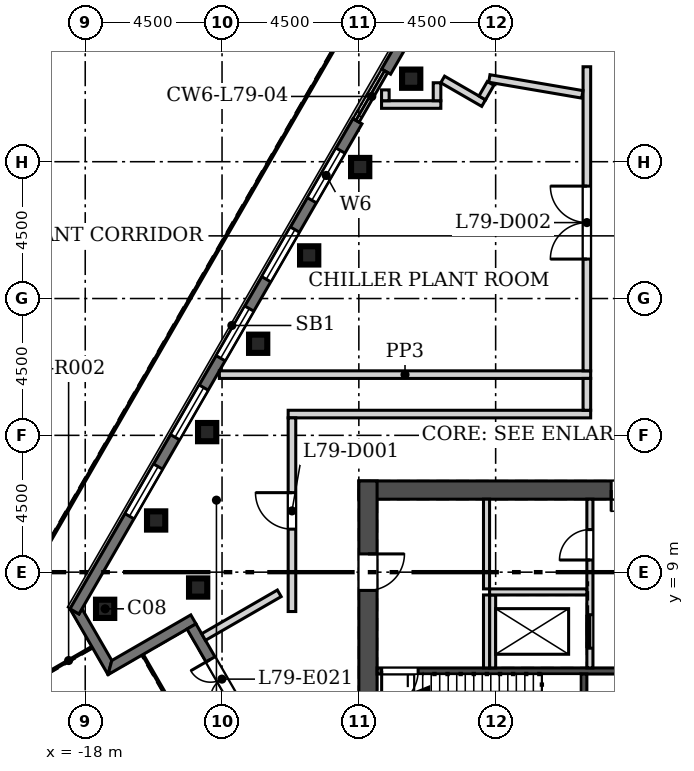
"""IFC4 building model, lengths in metres.
Left out: names, types, materials, properties, quantities, classifications, styles, units other than length and angle.
Written with IfcOpenShell. Run it as: python <this file> out.ifc"""

import sys

from ifc_helpers import new_model, si_unit, direction, frame, frame_2d, origin, origin_2d, place, context, subcontext, project, spatial, polyline, rectangle, hollow_rectangle, outline, extrude, element, fill, save


model = new_model("IFC4")
c1 = context("Model", 3, precision=1e-05, world=origin(), true_north=direction((0.0, 1.0)))
c2 = subcontext(c1, "Body", "Model", "MODEL_VIEW")
j1 = project(units=[si_unit("LENGTHUNIT", "METRE"), si_unit("PLANEANGLEUNIT", "RADIAN")], contexts=[c1])
p1 = place(None, origin())
s1 = spatial("IfcSite", under=j1, at=p1, CompositionType="ELEMENT")
p2 = place(p1, origin())
s2 = spatial("IfcBuilding", under=s1, at=p2, CompositionType="ELEMENT")
p3 = place(p2, frame((0.0, 0.0, 350.1)))
s3 = spatial("IfcBuildingStorey", under=s2, at=p3, CompositionType="ELEMENT", Elevation=350.1)
for number, where, z_axis, x_axis in (
    (1, (-17.345, 7.794, 0.0), (0.0, 0.0, 1.0), (1.0, 0.0, 0.0)),
    (2, (-14.286, 8.495, 0.0), (0.0, 0.0, 1.0), (1.0, 0.0, 0.0)),
    (3, (-7.278, 25.231, 0.0), (0.0, 0.0, 1.0), (1.0, 0.0, 0.0)),
    (4, (-8.956, 22.325, 0.0), (0.0, 0.0, 1.0), (1.0, 0.0, 0.0)),
    (5, (-10.634, 19.419, 0.0), (0.0, 0.0, 1.0), (1.0, 0.0, 0.0)),
    (6, (-12.312, 16.512, 0.0), (0.0, 0.0, 1.0), (1.0, 0.0, 0.0)),
    (7, (-13.99, 13.606, 0.0), (0.0, 0.0, 1.0), (1.0, 0.0, 0.0)),
    (8, (-15.667, 10.7, 0.0), (0.0, 0.0, 1.0), (1.0, 0.0, 0.0)),
):
    element("IfcColumn", number, at=place(p3, frame(where, z_axis=z_axis, x_axis=x_axis)), inside=s3, PredefinedType="COLUMN", context=c2, shape_type="SweptSolid", body=[
        extrude(hollow_rectangle(XDim=0.6, YDim=0.6, WallThickness=0.03, at=origin_2d()), origin(), (0.0, 0.0, 1.0), 4.4),
    ])
p4 = place(p3, frame((9.0, 11.7, 0.0), z_axis=(0.0, 0.0, 1.0), x_axis=(-1.0, 0.0, 0.0)))
e9 = element("IfcWall", 9, at=p4, inside=s3, PredefinedType="SHEAR", context=c2, shape_type="SweptSolid", body=[
    extrude(rectangle(XDim=18.0, YDim=0.6, at=frame_2d((9.0, 0.0))), origin(), (0.0, 0.0, 1.0), 5.0),
])
p5 = place(p4, frame((8.3, 0.0, 0.0)))
e10 = element("IfcOpeningElement", 10, at=p5, cuts=e9, PredefinedType="OPENING", context=c2, shape_type="SweptSolid", body=[
    extrude(rectangle(XDim=1.4, YDim=2.1, at=frame_2d((0.7, 1.05))), frame((0.0, 0.31, 0.0), z_axis=(0.0, -1.0, 0.0), x_axis=(1.0, 0.0, 0.0)), (0.0, 0.0, 1.0), 0.62),
])
p6 = place(p3, frame((-8.7, 12.0, 0.0), z_axis=(0.0, 0.0, 1.0), x_axis=(0.0, -1.0, 0.0)))
e11 = element("IfcWall", 11, at=p6, inside=s3, PredefinedType="SHEAR", context=c2, shape_type="SweptSolid", body=[
    extrude(rectangle(XDim=11.15, YDim=0.6, at=frame_2d((5.575, 0.0))), origin(), (0.0, 0.0, 1.0), 5.0),
])
p7 = place(p6, frame((2.4, 0.0, 0.0)))
e12 = element("IfcOpeningElement", 12, at=p7, cuts=e11, PredefinedType="OPENING", context=c2, shape_type="SweptSolid", body=[
    extrude(rectangle(XDim=1.2, YDim=2.1, at=frame_2d((0.6, 1.05))), frame((0.0, 0.31, 0.0), z_axis=(0.0, -1.0, 0.0), x_axis=(1.0, 0.0, 0.0)), (0.0, 0.0, 1.0), 0.62),
])
p8 = place(p3, origin())
e13 = element("IfcWall", 13, at=p8, inside=s3, PredefinedType="SOLIDWALL", context=c2, shape_type="SweptSolid", body=[
    extrude(outline(polyline([(-17.25, 5.628), (-18.501, 7.795), (-18.501, 7.795), (-18.206, 7.625), (-18.107, 7.795), (-17.125, 6.094), (-17.25, 5.628), (-17.25, 5.628)])), origin(), (0.0, 0.0, 1.0), 4.4),
])
p9 = place(p3, origin())
e14 = element("IfcWall", 14, at=p9, inside=s3, PredefinedType="SOLIDWALL", context=c2, shape_type="SweptSolid", body=[
    extrude(outline(polyline([(-14.527, 7.594), (-14.357, 7.299), (-14.652, 7.129), (-17.25, 5.628), (-17.251, 5.628), (-17.126, 6.094), (-14.527, 7.594)])), origin(), (0.0, 0.0, 1.0), 4.4),
])
p10 = place(p3, frame((-14.505, 7.214, 0.0), z_axis=(0.0, 0.0, 1.0), x_axis=(0.49999894854, -0.866026010844, 0.0)))
e15 = element("IfcWall", 15, at=p10, inside=s3, PredefinedType="SOLIDWALL", context=c2, shape_type="SweptSolid", body=[
    extrude(rectangle(XDim=4.0, YDim=0.34, at=frame_2d((2.0, 0.0))), origin(), (0.0, 0.0, 1.0), 4.4),
])
p11 = place(p10, frame((1.25, 0.0, 0.0)))
e16 = element("IfcOpeningElement", 16, at=p11, cuts=e15, PredefinedType="OPENING", context=c2, shape_type="SweptSolid", body=[
    extrude(rectangle(XDim=1.5, YDim=2.4, at=frame_2d((0.75, 1.2))), frame((0.0, 0.18, 0.0), z_axis=(0.0, -1.0, 0.0), x_axis=(1.0, 0.0, 0.0)), (0.0, 0.0, 1.0), 0.36),
])
p12 = place(p3, frame((-6.045, 29.026, 0.0), z_axis=(0.0, 0.0, 1.0), x_axis=(-0.500018604663, -0.866014662111, 0.0)))
e17 = element("IfcWall", 17, at=p12, inside=s3, PredefinedType="SOLIDWALL", context=c2, shape_type="SweptSolid", body=[
    extrude(rectangle(XDim=4.115, YDim=0.34, at=frame_2d((2.058, 0.0))), origin(), (0.0, 0.0, 1.0), 4.4),
])
p13 = place(p12, frame((1.115, 0.0, 0.0)))
e18 = element("IfcOpeningElement", 18, at=p13, cuts=e17, PredefinedType="OPENING", context=c2, shape_type="SweptSolid", body=[
    extrude(rectangle(XDim=1.885, YDim=2.6, at=frame_2d((0.942, 1.3))), frame((0.0, 0.18, 0.0), z_axis=(0.0, -1.0, 0.0), x_axis=(1.0, 0.0, 0.0)), (0.0, 0.0, 1.0), 0.36),
])
p14 = place(p3, frame((-9.045, 23.83, 0.0), z_axis=(0.0, 0.0, 1.0), x_axis=(-0.500004003655, -0.866023092261, 0.0)))
e19 = element("IfcWall", 19, at=p14, inside=s3, PredefinedType="SOLIDWALL", context=c2, shape_type="SweptSolid", body=[
    extrude(rectangle(XDim=18.615, YDim=0.34, at=frame_2d((9.308, 0.0))), origin(), (0.0, 0.0, 1.0), 4.4),
])
p15 = place(p14, frame((1.115, 0.0, 0.9)))
e20 = element("IfcOpeningElement", 20, at=p15, cuts=e19, PredefinedType="OPENING", context=c2, shape_type="SweptSolid", body=[
    extrude(rectangle(XDim=1.885, YDim=3.0, at=frame_2d((0.942, 1.5))), frame((0.0, 0.18, 0.0), z_axis=(0.0, -1.0, 0.0), x_axis=(1.0, 0.0, 0.0)), (0.0, 0.0, 1.0), 0.36),
])
p16 = place(p14, frame((4.115, 0.0, 0.9)))
e21 = element("IfcOpeningElement", 21, at=p16, cuts=e19, PredefinedType="OPENING", context=c2, shape_type="SweptSolid", body=[
    extrude(rectangle(XDim=1.885, YDim=3.0, at=frame_2d((0.942, 1.5))), frame((0.0, 0.18, 0.0), z_axis=(0.0, -1.0, 0.0), x_axis=(1.0, 0.0, 0.0)), (0.0, 0.0, 1.0), 0.36),
])
p17 = place(p14, frame((7.115, 0.0, 0.9)))
e22 = element("IfcOpeningElement", 22, at=p17, cuts=e19, PredefinedType="OPENING", context=c2, shape_type="SweptSolid", body=[
    extrude(rectangle(XDim=1.885, YDim=3.0, at=frame_2d((0.942, 1.5))), frame((0.0, 0.18, 0.0), z_axis=(0.0, -1.0, 0.0), x_axis=(1.0, 0.0, 0.0)), (0.0, 0.0, 1.0), 0.36),
])
p18 = place(p14, frame((10.115, 0.0, 0.9)))
e23 = element("IfcOpeningElement", 23, at=p18, cuts=e19, PredefinedType="OPENING", context=c2, shape_type="SweptSolid", body=[
    extrude(rectangle(XDim=1.885, YDim=3.0, at=frame_2d((0.942, 1.5))), frame((0.0, 0.18, 0.0), z_axis=(0.0, -1.0, 0.0), x_axis=(1.0, 0.0, 0.0)), (0.0, 0.0, 1.0), 0.36),
])
p19 = place(p14, frame((13.115, 0.0, 0.9)))
e24 = element("IfcOpeningElement", 24, at=p19, cuts=e19, PredefinedType="OPENING", context=c2, shape_type="SweptSolid", body=[
    extrude(rectangle(XDim=1.885, YDim=3.0, at=frame_2d((0.942, 1.5))), frame((0.0, 0.18, 0.0), z_axis=(0.0, -1.0, 0.0), x_axis=(1.0, 0.0, 0.0)), (0.0, 0.0, 1.0), 0.36),
])
p20 = place(p3, frame((-8.4, 5.75, -0.6), z_axis=(0.0, 0.0, 1.0), x_axis=(1.0, 0.0, 0.0)))
e25 = element("IfcWall", 25, at=p20, inside=s3, PredefinedType="SOLIDWALL", context=c2, shape_type="SweptSolid", body=[
    extrude(rectangle(XDim=16.8, YDim=0.2, at=frame_2d((8.4, 0.0))), origin(), (0.0, 0.0, 1.0), 5.0),
])
p21 = place(p20, frame((7.9, 0.0, 0.6)))
e26 = element("IfcOpeningElement", 26, at=p21, cuts=e25, PredefinedType="OPENING", context=c2, shape_type="SweptSolid", body=[
    extrude(rectangle(XDim=1.0, YDim=2.1, at=frame_2d((0.5, 1.05))), frame((0.0, 0.11, 0.0), z_axis=(0.0, -1.0, 0.0), x_axis=(1.0, 0.0, 0.0)), (0.0, 0.0, 1.0), 0.22),
])
p22 = place(p20, frame((0.15, 0.0, 0.6)))
e27 = element("IfcOpeningElement", 27, at=p22, cuts=e25, PredefinedType="OPENING", context=c2, shape_type="SweptSolid", body=[
    extrude(rectangle(XDim=1.2, YDim=2.1, at=frame_2d((0.6, 1.05))), frame((0.0, 0.11, 0.0), z_axis=(0.0, -1.0, 0.0), x_axis=(1.0, 0.0, 0.0)), (0.0, 0.0, 1.0), 0.22),
])
p23 = place(p20, frame((15.45, 0.0, 0.6)))
e28 = element("IfcOpeningElement", 28, at=p23, cuts=e25, PredefinedType="OPENING", context=c2, shape_type="SweptSolid", body=[
    extrude(rectangle(XDim=1.2, YDim=2.1, at=frame_2d((0.6, 1.05))), frame((0.0, 0.11, 0.0), z_axis=(0.0, -1.0, 0.0), x_axis=(1.0, 0.0, 0.0)), (0.0, 0.0, 1.0), 0.22),
])
p24 = place(p3, frame((-1.6, 1.45, -0.6), z_axis=(0.0, 0.0, 1.0), x_axis=(0.0, 1.0, 0.0)))
e29 = element("IfcWall", 29, at=p24, inside=s3, PredefinedType="SOLIDWALL", context=c2, shape_type="SweptSolid", body=[
    extrude(rectangle(XDim=4.2, YDim=0.2, at=frame_2d((2.1, 0.0))), origin(), (0.0, 0.0, 1.0), 5.0),
])
p25 = place(p3, frame((-1.4, 5.85, 0.0), z_axis=(0.0, 0.0, 1.0), x_axis=(0.0, 1.0, 0.0)))
e30 = element("IfcWall", 30, at=p25, inside=s3, PredefinedType="SOLIDWALL", context=c2, shape_type="SweptSolid", body=[
    extrude(rectangle(XDim=5.55, YDim=0.2, at=frame_2d((2.775, 0.0))), origin(), (0.0, 0.0, 1.0), 4.4),
])
p26 = place(p25, frame((0.65, 0.0, 0.0)))
e31 = element("IfcOpeningElement", 31, at=p26, cuts=e30, PredefinedType="OPENING", context=c2, shape_type="SweptSolid", body=[
    extrude(rectangle(XDim=1.1, YDim=2.1, at=frame_2d((0.55, 1.05))), frame((0.0, 0.11, 0.0), z_axis=(0.0, -1.0, 0.0), x_axis=(1.0, 0.0, 0.0)), (0.0, 0.0, 1.0), 0.22),
])
p27 = place(p25, frame((3.55, 0.0, 0.0)))
e32 = element("IfcOpeningElement", 32, at=p27, cuts=e30, PredefinedType="OPENING", context=c2, shape_type="SweptSolid", body=[
    extrude(rectangle(XDim=1.0, YDim=2.1, at=frame_2d((0.5, 1.05))), frame((0.0, 0.11, 0.0), z_axis=(0.0, -1.0, 0.0), x_axis=(1.0, 0.0, 0.0)), (0.0, 0.0, 1.0), 0.22),
])
p28 = place(p3, frame((-4.6, 5.85, 0.0), z_axis=(0.0, 0.0, 1.0), x_axis=(0.0, 1.0, 0.0)))
e33 = element("IfcWall", 33, at=p28, inside=s3, PredefinedType="SOLIDWALL", context=c2, shape_type="SweptSolid", body=[
    extrude(rectangle(XDim=2.4, YDim=0.2, at=frame_2d((1.2, 0.0))), origin(), (0.0, 0.0, 1.0), 4.4),
])
p29 = place(p3, frame((-4.7, 8.35, 0.0), z_axis=(0.0, 0.0, 1.0), x_axis=(1.0, 0.0, 0.0)))
e34 = element("IfcWall", 34, at=p29, inside=s3, PredefinedType="SOLIDWALL", context=c2, shape_type="SweptSolid", body=[
    extrude(rectangle(XDim=3.2, YDim=0.2, at=frame_2d((1.6, 0.0))), origin(), (0.0, 0.0, 1.0), 4.4),
])
p30 = place(p3, frame((-4.8, 8.45, 0.0), z_axis=(0.0, 0.0, 1.0), x_axis=(0.0, 1.0, 0.0)))
e35 = element("IfcWall", 35, at=p30, inside=s3, PredefinedType="SOLIDWALL", context=c2, shape_type="SweptSolid", body=[
    extrude(rectangle(XDim=2.95, YDim=0.2, at=frame_2d((1.475, 0.0))), origin(), (0.0, 0.0, 1.0), 4.4),
])
p31 = place(p3, frame((-4.8, 5.85, 0.0), z_axis=(0.0, 0.0, 1.0), x_axis=(0.0, 1.0, 0.0)))
e36 = element("IfcWall", 36, at=p31, inside=s3, PredefinedType="SOLIDWALL", context=c2, shape_type="SweptSolid", body=[
    extrude(rectangle(XDim=2.4, YDim=0.2, at=frame_2d((1.2, 0.0))), origin(), (0.0, 0.0, 1.0), 4.4),
])
p32 = place(p3, frame((-13.588, 15.497, 0.0), z_axis=(0.0, 0.0, 1.0), x_axis=(1.0, 0.0, 0.0)))
e37 = element("IfcWall", 37, at=p32, inside=s3, PredefinedType="SOLIDWALL", context=c2, shape_type="SweptSolid", body=[
    extrude(rectangle(XDim=12.213, YDim=0.25, at=frame_2d((6.106, 0.0))), origin(), (0.0, 0.0, 1.0), 4.4),
])
p33 = place(p3, frame((-1.5, 15.622, 0.0), z_axis=(0.0, 0.0, 1.0), x_axis=(0.0, 1.0, 0.0)))
e38 = element("IfcWall", 38, at=p33, inside=s3, PredefinedType="SOLIDWALL", context=c2, shape_type="SweptSolid", body=[
    extrude(rectangle(XDim=10.001, YDim=0.25, at=frame_2d((5.0, 0.0))), origin(), (0.0, 0.0, 1.0), 4.4),
])
p34 = place(p33, frame((3.676, 0.0, 0.0)))
e39 = element("IfcOpeningElement", 39, at=p34, cuts=e38, PredefinedType="OPENING", context=c2, shape_type="SweptSolid", body=[
    extrude(rectangle(XDim=2.4, YDim=2.4, at=frame_2d((1.2, 1.2))), frame((0.0, 0.135, 0.0), z_axis=(0.0, -1.0, 0.0), x_axis=(1.0, 0.0, 0.0)), (0.0, 0.0, 1.0), 0.27),
])
p35 = place(p3, frame((-11.325, 14.2, 0.0), z_axis=(0.0, 0.0, 1.0), x_axis=(1.0, 0.0, 0.0)))
e40 = element("IfcWall", 40, at=p35, inside=s3, PredefinedType="SOLIDWALL", context=c2, shape_type="SweptSolid", body=[
    extrude(rectangle(XDim=9.95, YDim=0.25, at=frame_2d((4.975, 0.0))), origin(), (0.0, 0.0, 1.0), 4.4),
])
p36 = place(p3, frame((-11.2, 7.705, 0.0), z_axis=(0.0, 0.0, 1.0), x_axis=(0.0, 1.0, 0.0)))
e41 = element("IfcWall", 41, at=p36, inside=s3, PredefinedType="SOLIDWALL", context=c2, shape_type="SweptSolid", body=[
    extrude(rectangle(XDim=6.37, YDim=0.25, at=frame_2d((3.185, 0.0))), origin(), (0.0, 0.0, 1.0), 4.4),
])
p37 = place(p36, frame((2.71, 0.0, 0.0)))
e42 = element("IfcOpeningElement", 42, at=p37, cuts=e41, PredefinedType="OPENING", context=c2, shape_type="SweptSolid", body=[
    extrude(rectangle(XDim=1.2, YDim=2.1, at=frame_2d((0.6, 1.05))), frame((0.0, 0.135, 0.0), z_axis=(0.0, -1.0, 0.0), x_axis=(1.0, 0.0, 0.0)), (0.0, 0.0, 1.0), 0.27),
])
p38 = place(p3, frame((-1.649, 24.715, 0.0), z_axis=(0.0, 0.0, 1.0), x_axis=(-0.98569851909, 0.168518335692, 0.0)))
e43 = element("IfcWall", 43, at=p38, inside=s3, PredefinedType="SOLIDWALL", context=c2, shape_type="SweptSolid", body=[
    extrude(rectangle(XDim=3.103, YDim=0.25, at=frame_2d((1.552, 0.0))), origin(), (0.0, 0.0, 1.0), 4.4),
])
p39 = place(p3, frame((-14.107, 6.866, 0.0), z_axis=(0.0, 0.0, 1.0), x_axis=(0.866018712932, 0.500011588718, 0.0)))
e44 = element("IfcWall", 44, at=p39, inside=s3, PredefinedType="SOLIDWALL", context=c2, shape_type="SweptSolid", body=[
    extrude(rectangle(XDim=2.875, YDim=0.25, at=frame_2d((1.438, 0.0))), origin(), (0.0, 0.0, 1.0), 4.4),
])
p40 = place(p3, frame((-6.303, 24.381, 0.0), z_axis=(0.0, 0.0, 1.0), x_axis=(-1.0, 0.0, 0.0)))
e45 = element("IfcWall", 45, at=p40, inside=s3, PredefinedType="SOLIDWALL", context=c2, shape_type="SweptSolid", body=[
    extrude(rectangle(XDim=1.95, YDim=0.25, at=frame_2d((0.975, 0.0))), origin(), (0.0, 0.0, 1.0), 4.4),
])
p41 = place(p3, frame((-4.896, 24.428, 0.0), z_axis=(0.0, 0.0, 1.0), x_axis=(-0.86604181439, 0.49997157492, 0.0)))
e46 = element("IfcWall", 46, at=p41, inside=s3, PredefinedType="SOLIDWALL", context=c2, shape_type="SweptSolid", body=[
    extrude(rectangle(XDim=1.555, YDim=0.25, at=frame_2d((0.778, 0.0))), origin(), (0.0, 0.0, 1.0), 4.4),
])
p42 = place(p3, frame((-1.5, 14.325, 0.0), z_axis=(0.0, 0.0, 1.0), x_axis=(0.0, 1.0, 0.0)))
e47 = element("IfcWall", 47, at=p42, inside=s3, PredefinedType="SOLIDWALL", context=c2, shape_type="SweptSolid", body=[
    extrude(rectangle(XDim=1.047, YDim=0.25, at=frame_2d((0.523, 0.0))), origin(), (0.0, 0.0, 1.0), 4.4),
])
p43 = place(p3, frame((-6.428, 25.097, 0.0), z_axis=(0.0, 0.0, 1.0), x_axis=(0.0, -1.0, 0.0)))
e48 = element("IfcWall", 48, at=p43, inside=s3, PredefinedType="SOLIDWALL", context=c2, shape_type="SweptSolid", body=[
    extrude(rectangle(XDim=0.591, YDim=0.25, at=frame_2d((0.295, 0.0))), origin(), (0.0, 0.0, 1.0), 4.4),
])
p44 = place(p3, frame((-4.666, 25.076, 0.0), z_axis=(0.0, 0.0, 1.0), x_axis=(-0.499952654668, -0.866052736899, 0.0)))
e49 = element("IfcWall", 49, at=p44, inside=s3, PredefinedType="SOLIDWALL", context=c2, shape_type="SweptSolid", body=[
    extrude(rectangle(XDim=0.551, YDim=0.25, at=frame_2d((0.275, 0.0))), origin(), (0.0, 0.0, 1.0), 4.4),
])
p45 = place(p3, frame((-8.128, 24.506, 0.0), z_axis=(0.0, 0.0, 1.0), x_axis=(0.0, 1.0, 0.0)))
e50 = element("IfcWall", 50, at=p45, inside=s3, PredefinedType="SOLIDWALL", context=c2, shape_type="SweptSolid", body=[
    extrude(rectangle(XDim=0.356, YDim=0.25, at=frame_2d((0.178, 0.0))), origin(), (0.0, 0.0, 1.0), 4.4),
])
p46 = place(p11, frame((1.5, 0.0, 0.0), z_axis=(0.0, 0.0, 1.0), x_axis=(-1.0, 0.0, 0.0)))
e51 = element("IfcDoor", 51, at=p46, inside=s3, OperationType="DOUBLE_DOOR_SINGLE_SWING", PredefinedType="DOOR", context=c2, shape_type="SweptSolid", body=[
    extrude(rectangle(XDim=1.5, YDim=2.4, at=frame_2d((0.75, 1.2))), frame((0.0, 0.025, 0.0), z_axis=(0.0, -1.0, 0.0), x_axis=(1.0, 0.0, 0.0)), (0.0, 0.0, 1.0), 0.05),
])
fill(e16, e51)
p47 = place(p15, origin())
e52 = element("IfcWindow", 52, at=p47, inside=s3, PartitioningType="SINGLE_PANEL", PredefinedType="WINDOW", context=c2, shape_type="SweptSolid", body=[
    extrude(rectangle(XDim=1.885, YDim=3.0, at=frame_2d((0.942, 1.5))), frame((0.0, 0.11, 0.0), z_axis=(0.0, -1.0, 0.0), x_axis=(1.0, 0.0, 0.0)), (0.0, 0.0, 1.0), 0.06),
])
fill(e20, e52)
p48 = place(p16, origin())
e53 = element("IfcWindow", 53, at=p48, inside=s3, PartitioningType="SINGLE_PANEL", PredefinedType="WINDOW", context=c2, shape_type="SweptSolid", body=[
    extrude(rectangle(XDim=1.885, YDim=3.0, at=frame_2d((0.942, 1.5))), frame((0.0, 0.11, 0.0), z_axis=(0.0, -1.0, 0.0), x_axis=(1.0, 0.0, 0.0)), (0.0, 0.0, 1.0), 0.06),
])
fill(e21, e53)
p49 = place(p17, origin())
e54 = element("IfcWindow", 54, at=p49, inside=s3, PartitioningType="SINGLE_PANEL", PredefinedType="WINDOW", context=c2, shape_type="SweptSolid", body=[
    extrude(rectangle(XDim=1.885, YDim=3.0, at=frame_2d((0.942, 1.5))), frame((0.0, 0.11, 0.0), z_axis=(0.0, -1.0, 0.0), x_axis=(1.0, 0.0, 0.0)), (0.0, 0.0, 1.0), 0.06),
])
fill(e22, e54)
p50 = place(p18, origin())
e55 = element("IfcWindow", 55, at=p50, inside=s3, PartitioningType="SINGLE_PANEL", PredefinedType="WINDOW", context=c2, shape_type="SweptSolid", body=[
    extrude(rectangle(XDim=1.885, YDim=3.0, at=frame_2d((0.942, 1.5))), frame((0.0, 0.11, 0.0), z_axis=(0.0, -1.0, 0.0), x_axis=(1.0, 0.0, 0.0)), (0.0, 0.0, 1.0), 0.06),
])
fill(e23, e55)
p51 = place(p19, origin())
e56 = element("IfcWindow", 56, at=p51, inside=s3, PartitioningType="SINGLE_PANEL", PredefinedType="WINDOW", context=c2, shape_type="SweptSolid", body=[
    extrude(rectangle(XDim=1.885, YDim=3.0, at=frame_2d((0.942, 1.5))), frame((0.0, 0.11, 0.0), z_axis=(0.0, -1.0, 0.0), x_axis=(1.0, 0.0, 0.0)), (0.0, 0.0, 1.0), 0.06),
])
fill(e24, e56)
p52 = place(p26, origin())
e57 = element("IfcDoor", 57, at=p52, inside=s3, OperationType="SLIDING_TO_RIGHT", PredefinedType="DOOR", context=c2, shape_type="SweptSolid", body=[
    extrude(rectangle(XDim=1.1, YDim=2.1, at=frame_2d((0.55, 1.05))), frame((0.0, 0.025, 0.0), z_axis=(0.0, -1.0, 0.0), x_axis=(1.0, 0.0, 0.0)), (0.0, 0.0, 1.0), 0.05),
])
fill(e31, e57)
p53 = place(p7, origin())
e58 = element("IfcDoor", 58, at=p53, inside=s3, OperationType="SINGLE_SWING_LEFT", PredefinedType="DOOR", context=c2, shape_type="SweptSolid", body=[
    extrude(rectangle(XDim=1.2, YDim=2.1, at=frame_2d((0.6, 1.05))), frame((0.0, 0.025, 0.0), z_axis=(0.0, -1.0, 0.0), x_axis=(1.0, 0.0, 0.0)), (0.0, 0.0, 1.0), 0.05),
])
fill(e12, e58)
p54 = place(p22, frame((1.2, 0.0, 0.0), z_axis=(0.0, 0.0, 1.0), x_axis=(-1.0, 0.0, 0.0)))
e59 = element("IfcDoor", 59, at=p54, inside=s3, OperationType="SINGLE_SWING_RIGHT", PredefinedType="DOOR", context=c2, shape_type="SweptSolid", body=[
    extrude(rectangle(XDim=1.2, YDim=2.1, at=frame_2d((0.6, 1.05))), frame((0.0, 0.025, 0.0), z_axis=(0.0, -1.0, 0.0), x_axis=(1.0, 0.0, 0.0)), (0.0, 0.0, 1.0), 0.05),
])
fill(e27, e59)
p55 = place(p27, origin())
e60 = element("IfcDoor", 60, at=p55, inside=s3, OperationType="SINGLE_SWING_LEFT", PredefinedType="DOOR", context=c2, shape_type="SweptSolid", body=[
    extrude(rectangle(XDim=1.0, YDim=2.1, at=frame_2d((0.5, 1.05))), frame((0.0, 0.025, 0.0), z_axis=(0.0, -1.0, 0.0), x_axis=(1.0, 0.0, 0.0)), (0.0, 0.0, 1.0), 0.05),
])
fill(e32, e60)
p56 = place(p5, origin())
e61 = element("IfcDoor", 61, at=p56, inside=s3, OperationType="DOUBLE_DOOR_SINGLE_SWING", PredefinedType="DOOR", context=c2, shape_type="SweptSolid", body=[
    extrude(rectangle(XDim=1.4, YDim=2.1, at=frame_2d((0.7, 1.05))), frame((0.0, 0.025, 0.0), z_axis=(0.0, -1.0, 0.0), x_axis=(1.0, 0.0, 0.0)), (0.0, 0.0, 1.0), 0.05),
])
fill(e10, e61)
p57 = place(p37, origin())
e62 = element("IfcDoor", 62, at=p57, inside=s3, OperationType="SINGLE_SWING_RIGHT", PredefinedType="DOOR", context=c2, shape_type="SweptSolid", body=[
    extrude(rectangle(XDim=1.2, YDim=2.1, at=frame_2d((0.6, 1.05))), frame((0.0, 0.025, 0.0), z_axis=(0.0, -1.0, 0.0), x_axis=(1.0, 0.0, 0.0)), (0.0, 0.0, 1.0), 0.05),
])
fill(e42, e62)
p58 = place(p34, origin())
e63 = element("IfcDoor", 63, at=p58, inside=s3, OperationType="DOUBLE_DOOR_SINGLE_SWING", PredefinedType="DOOR", context=c2, shape_type="SweptSolid", body=[
    extrude(rectangle(XDim=2.4, YDim=2.4, at=frame_2d((1.2, 1.2))), frame((0.0, 0.025, 0.0), z_axis=(0.0, -1.0, 0.0), x_axis=(1.0, 0.0, 0.0)), (0.0, 0.0, 1.0), 0.05),
])
fill(e39, e63)
save(model, sys.argv[1])
